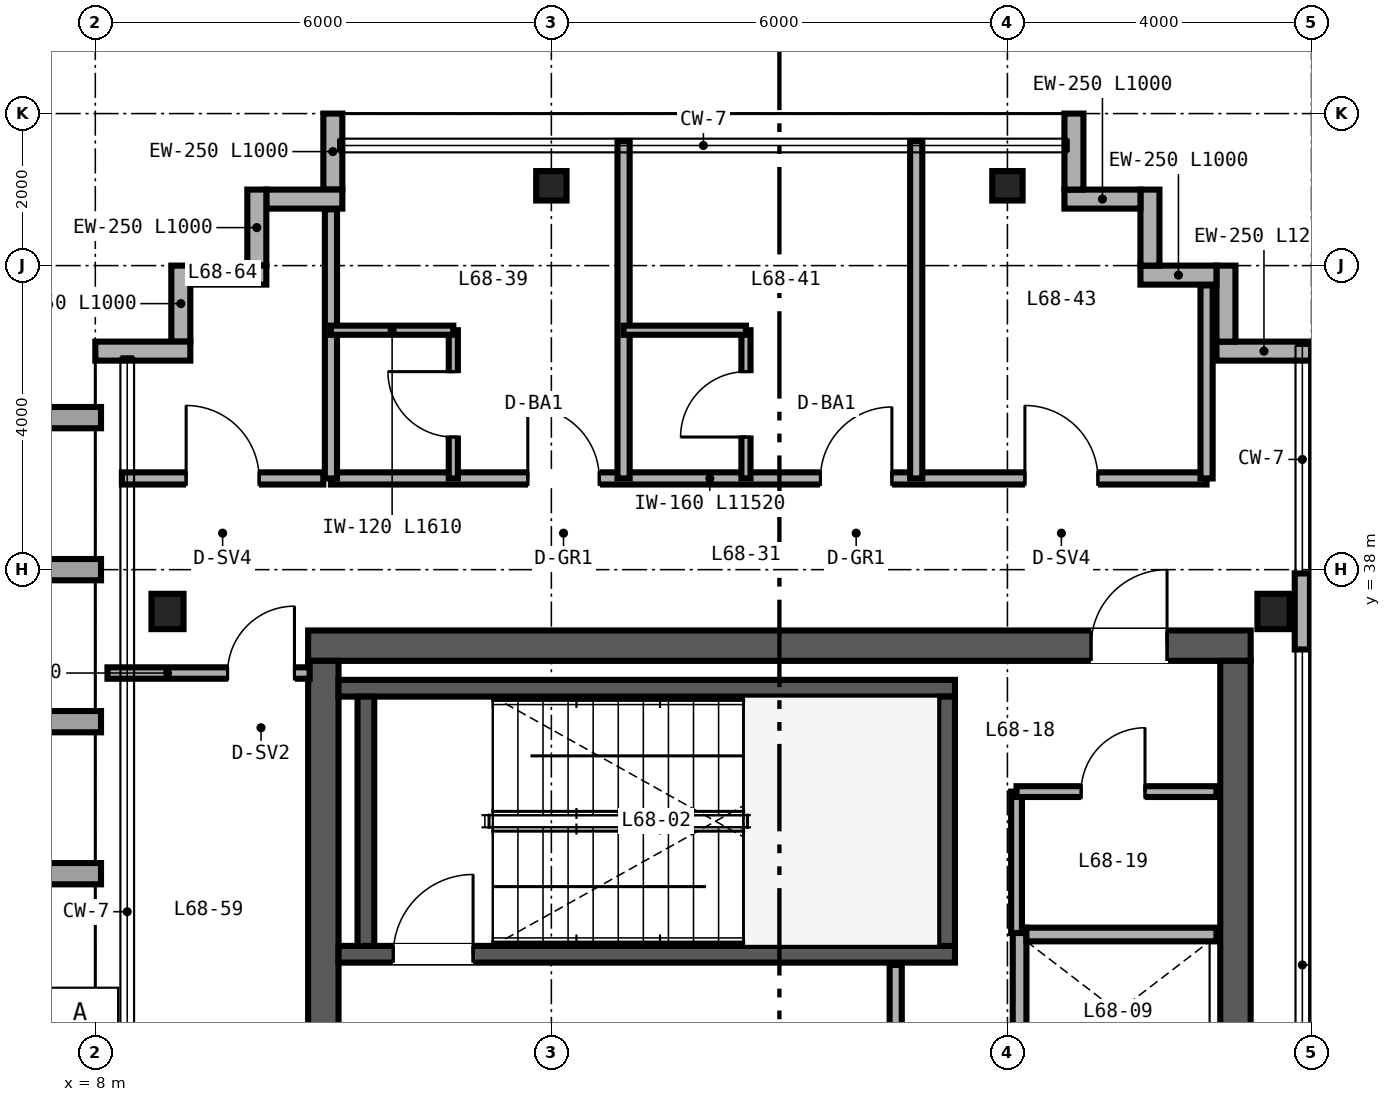
"""IFC4 building model, lengths in metres.
Left out: names, types, materials, properties, quantities, classifications, styles, units other than length and angle.
Written with IfcOpenShell. Run it as: python <this file> out.ifc"""

import sys

from ifc_helpers import new_model, si_unit, direction, frame, frame_2d, origin, origin_2d, place, context, subcontext, project, spatial, rectangle, i_section, extrude, source, transform, mapped, element, fill, save


model = new_model("IFC4")
c1 = context("Model", 3, precision=1e-05, world=origin(), true_north=direction((0.0, 1.0)))
c2 = subcontext(c1, "Body", "Model", "MODEL_VIEW")
j1 = project(units=[si_unit("LENGTHUNIT", "METRE"), si_unit("PLANEANGLEUNIT", "RADIAN")], contexts=[c1])
p1 = place(None, origin())
s1 = spatial("IfcSite", under=j1, at=p1, CompositionType="ELEMENT")
p2 = place(p1, origin())
s2 = spatial("IfcBuilding", under=s1, at=p2, CompositionType="ELEMENT")
p3 = place(p2, frame((0.0, 0.0, 268.8)))
s3 = spatial("IfcBuildingStorey", under=s2, at=p3, CompositionType="ELEMENT", Elevation=268.8)
p4 = place(p3, frame((10.8, 37.0, 0.0), z_axis=(0.0, 0.0, 1.0), x_axis=(1.0, 0.0, 0.0)))
e1 = element("IfcWall", 1, at=p4, inside=s3, PredefinedType="SHEAR", context=c2, shape_type="SweptSolid", body=[
    extrude(rectangle(XDim=12.4, YDim=0.4, at=frame_2d((6.2, 0.0))), origin(), (0.0, 0.0, 1.0), 3.28),
])
p5 = place(p4, frame((10.3, 0.0, 0.0)))
e2 = element("IfcOpeningElement", 2, at=p5, cuts=e1, PredefinedType="OPENING", context=c2, shape_type="SweptSolid", body=[
    extrude(rectangle(XDim=1.0, YDim=2.15, at=frame_2d((0.5, 1.075))), frame((0.0, 0.21, 0.0), z_axis=(0.0, -1.0, 0.0), x_axis=(1.0, 0.0, 0.0)), (0.0, 0.0, 1.0), 0.42),
])
for number, where, z_axis, x_axis in (
    (3, (11.0, 15.2, 0.0), (0.0, 0.0, 1.0), (0.0, 1.0, 0.0)),
    (4, (23.0, 15.2, 0.0), (0.0, 0.0, 1.0), (0.0, 1.0, 0.0)),
):
    element("IfcWall", number, at=place(p3, frame(where, z_axis=z_axis, x_axis=x_axis)), inside=s3, PredefinedType="SHEAR", context=c2, shape_type="SweptSolid", body=[
        extrude(rectangle(XDim=21.6, YDim=0.4, at=frame_2d((10.8, 0.0))), origin(), (0.0, 0.0, 1.0), 3.28),
    ])
p6 = place(p3, frame((11.2, 32.94, 0.0), z_axis=(0.0, 0.0, 1.0), x_axis=(1.0, 0.0, 0.0)))
e5 = element("IfcWall", 5, at=p6, inside=s3, PredefinedType="SHEAR", context=c2, shape_type="SweptSolid", body=[
    extrude(rectangle(XDim=8.11, YDim=0.22, at=frame_2d((4.055, 0.0))), origin(), (0.0, 0.0, 1.0), 3.4),
])
p7 = place(p6, frame((0.72, 0.0, 0.0)))
e6 = element("IfcOpeningElement", 6, at=p7, cuts=e5, PredefinedType="OPENING", context=c2, shape_type="SweptSolid", body=[
    extrude(rectangle(XDim=1.05, YDim=2.15, at=frame_2d((0.525, 1.075))), frame((0.0, 0.12, 0.0), z_axis=(0.0, -1.0, 0.0), x_axis=(1.0, 0.0, 0.0)), (0.0, 0.0, 1.0), 0.24),
])
p8 = place(p3, frame((11.2, 36.44, 0.0), z_axis=(0.0, 0.0, 1.0), x_axis=(1.0, 0.0, 0.0)))
e7 = element("IfcWall", 7, at=p8, inside=s3, PredefinedType="SHEAR", context=c2, shape_type="SweptSolid", body=[
    extrude(rectangle(XDim=8.11, YDim=0.22, at=frame_2d((4.055, 0.0))), origin(), (0.0, 0.0, 1.0), 3.4),
])
for number, where, z_axis, x_axis in (
    (8, (11.56, 33.05, 0.0), (0.0, 0.0, 1.0), (0.0, 1.0, 0.0)),
    (9, (19.2, 33.05, 0.0), (0.0, 0.0, 1.0), (0.0, 1.0, 0.0)),
):
    element("IfcWall", number, at=place(p3, frame(where, z_axis=z_axis, x_axis=x_axis)), inside=s3, PredefinedType="SHEAR", context=c2, shape_type="SweptSolid", body=[
        extrude(rectangle(XDim=3.28, YDim=0.22, at=frame_2d((1.64, 0.0))), origin(), (0.0, 0.0, 1.0), 3.4),
    ])
m1 = source(origin(), c2, "Body", "SweptSolid", [
    extrude(i_section(OverallWidth=0.422, OverallDepth=0.465, WebThickness=0.045, FlangeThickness=0.073, FilletRadius=0.025, at=origin_2d()), origin(), (0.0, 0.0, 1.0), 3.28),
])
for number, where, z_axis, x_axis in (
    (10, (8.95, 37.45, 0.0), (0.0, 0.0, 1.0), (1.0, 0.0, 0.0)),
    (11, (23.5, 37.45, 0.0), (0.0, 0.0, 1.0), (1.0, 0.0, 0.0)),
):
    element("IfcColumn", number, at=place(p3, frame(where, z_axis=z_axis, x_axis=x_axis)), inside=s3, PredefinedType="COLUMN", context=c2, shape_type="MappedRepresentation", body=[
        mapped(m1, transform((0.0, 0.0, 0.0), scale=1.0)),
    ])
m2 = source(origin(), c2, "Body", "SweptSolid", [
    extrude(i_section(OverallWidth=0.399, OverallDepth=0.387, WebThickness=0.021, FlangeThickness=0.033, FilletRadius=0.025, at=origin_2d()), origin(), (0.0, 0.0, 1.0), 3.28),
])
for number, where, z_axis, x_axis in (
    (12, (14.0, 43.05, 0.0), (0.0, 0.0, 1.0), (1.0, 0.0, 0.0)),
    (13, (20.0, 43.05, 0.0), (0.0, 0.0, 1.0), (1.0, 0.0, 0.0)),
):
    element("IfcColumn", number, at=place(p3, frame(where, z_axis=z_axis, x_axis=x_axis)), inside=s3, PredefinedType="COLUMN", context=c2, shape_type="MappedRepresentation", body=[
        mapped(m2, transform((0.0, 0.0, 0.0), scale=1.0)),
    ])
p9 = place(p3, frame((24.0, 40.875, 0.0), z_axis=(0.0, 0.0, 1.0), x_axis=(-1.0, 0.0, 0.0)))
e14 = element("IfcWall", 14, at=p9, inside=s3, PredefinedType="SOLIDWALL", context=c2, shape_type="SweptSolid", body=[
    extrude(rectangle(XDim=1.25, YDim=0.25, at=frame_2d((0.625, 0.0))), origin(), (0.0, 0.0, 1.0), 3.28),
])
for number, where, z_axis, x_axis in (
    (15, (22.875, 41.0, 0.0), (0.0, 0.0, 1.0), (0.0, 1.0, 0.0)),
    (16, (22.75, 41.875, 0.0), (0.0, 0.0, 1.0), (-1.0, 0.0, 0.0)),
    (17, (21.875, 42.0, 0.0), (0.0, 0.0, 1.0), (0.0, 1.0, 0.0)),
    (18, (21.75, 42.875, 0.0), (0.0, 0.0, 1.0), (-1.0, 0.0, 0.0)),
    (19, (20.875, 43.0, 0.0), (0.0, 0.0, 1.0), (0.0, 1.0, 0.0)),
    (20, (11.125, 44.0, 0.0), (0.0, 0.0, 1.0), (0.0, -1.0, 0.0)),
    (21, (11.25, 42.875, 0.0), (0.0, 0.0, 1.0), (-1.0, 0.0, 0.0)),
    (22, (10.125, 43.0, 0.0), (0.0, 0.0, 1.0), (0.0, -1.0, 0.0)),
    (23, (10.25, 41.875, 0.0), (0.0, 0.0, 1.0), (-1.0, 0.0, 0.0)),
    (24, (9.125, 42.0, 0.0), (0.0, 0.0, 1.0), (0.0, -1.0, 0.0)),
):
    element("IfcWall", number, at=place(p3, frame(where, z_axis=z_axis, x_axis=x_axis)), inside=s3, PredefinedType="SOLIDWALL", context=c2, shape_type="SweptSolid", body=[
        extrude(rectangle(XDim=1.0, YDim=0.25, at=frame_2d((0.5, 0.0))), origin(), (0.0, 0.0, 1.0), 3.28),
    ])
p10 = place(p3, frame((9.25, 40.875, 0.0), z_axis=(0.0, 0.0, 1.0), x_axis=(-1.0, 0.0, 0.0)))
e25 = element("IfcWall", 25, at=p10, inside=s3, PredefinedType="SOLIDWALL", context=c2, shape_type="SweptSolid", body=[
    extrude(rectangle(XDim=1.25, YDim=0.25, at=frame_2d((0.625, 0.0))), origin(), (0.0, 0.0, 1.0), 3.28),
])
p11 = place(p3, frame((23.88, 36.95, 0.0), z_axis=(0.0, 0.0, 1.0), x_axis=(0.0, 1.0, 0.0)))
e26 = element("IfcWall", 26, at=p11, inside=s3, PredefinedType="PARAPET", context=c2, shape_type="SweptSolid", body=[
    extrude(rectangle(XDim=1.0, YDim=0.2, at=frame_2d((0.5, 0.0))), origin(), (0.0, 0.0, 1.0), 1.73),
])
p12 = place(p3, frame((20.16, 29.0, 0.0), z_axis=(0.0, 0.0, 1.0), x_axis=(0.0, 1.0, 0.0)))
e27 = element("IfcWall", 27, at=p12, inside=s3, PredefinedType="SOLIDWALL", context=c2, shape_type="SweptSolid", body=[
    extrude(rectangle(XDim=4.29, YDim=0.18, at=frame_2d((2.145, 0.0))), origin(), (0.0, 0.0, 1.0), 3.28),
])
p13 = place(p3, frame((20.25, 33.2, 0.0), z_axis=(0.0, 0.0, 1.0), x_axis=(1.0, 0.0, 0.0)))
e28 = element("IfcWall", 28, at=p13, inside=s3, PredefinedType="SOLIDWALL", context=c2, shape_type="SweptSolid", body=[
    extrude(rectangle(XDim=2.5, YDim=0.18, at=frame_2d((1.25, 0.0))), origin(), (0.0, 0.0, 1.0), 3.28),
])
p14 = place(p3, frame((18.53, 28.9, 0.0), z_axis=(0.0, 0.0, 1.0), x_axis=(0.0, 1.0, 0.0)))
e29 = element("IfcWall", 29, at=p14, inside=s3, PredefinedType="PARTITIONING", context=c2, shape_type="SweptSolid", body=[
    extrude(rectangle(XDim=3.9, YDim=0.16, at=frame_2d((1.95, 0.0))), origin(), (0.0, 0.0, 1.0), 3.28),
])
p15 = place(p14, frame((1.5, 0.0, 0.0)))
e30 = element("IfcOpeningElement", 30, at=p15, cuts=e29, PredefinedType="OPENING", context=c2, shape_type="SweptSolid", body=[
    extrude(rectangle(XDim=1.0, YDim=2.15, at=frame_2d((0.5, 1.075))), frame((0.0, 0.09, 0.0), z_axis=(0.0, -1.0, 0.0), x_axis=(1.0, 0.0, 0.0)), (0.0, 0.0, 1.0), 0.18),
])
p16 = place(p3, frame((20.12, 33.22, 0.0), z_axis=(0.0, 0.0, 1.0), x_axis=(0.0, 1.0, 0.0)))
e31 = element("IfcWall", 31, at=p16, inside=s3, PredefinedType="PARTITIONING", context=c2, shape_type="SweptSolid", body=[
    extrude(rectangle(XDim=1.86, YDim=0.142, at=frame_2d((0.93, 0.0))), origin(), (0.0, 0.0, 1.0), 3.28),
])
p17 = place(p3, frame((20.12, 35.08, 0.0), z_axis=(0.0, 0.0, 1.0), x_axis=(1.0, 0.0, 0.0)))
e32 = element("IfcWall", 32, at=p17, inside=s3, PredefinedType="PARTITIONING", context=c2, shape_type="SweptSolid", body=[
    extrude(rectangle(XDim=2.63, YDim=0.142, at=frame_2d((1.315, 0.0))), origin(), (0.0, 0.0, 1.0), 3.28),
])
p18 = place(p17, frame((0.85, 0.0, 0.0)))
e33 = element("IfcOpeningElement", 33, at=p18, cuts=e32, PredefinedType="OPENING", context=c2, shape_type="SweptSolid", body=[
    extrude(rectangle(XDim=0.84, YDim=2.1, at=frame_2d((0.42, 1.05))), frame((0.0, 0.081, 0.0), z_axis=(0.0, -1.0, 0.0), x_axis=(1.0, 0.0, 0.0)), (0.0, 0.0, 1.0), 0.162),
])
p19 = place(p3, frame((11.1, 39.2, 0.0), z_axis=(0.0, 0.0, 1.0), x_axis=(1.0, 0.0, 0.0)))
e34 = element("IfcWall", 34, at=p19, inside=s3, PredefinedType="PARTITIONING", context=c2, shape_type="SweptSolid", body=[
    extrude(rectangle(XDim=11.52, YDim=0.16, at=frame_2d((5.76, 0.0))), origin(), (0.0, 0.0, 1.0), 3.28),
])
p20 = place(p19, frame((2.59, 0.0, 0.0)))
e35 = element("IfcOpeningElement", 35, at=p20, cuts=e34, PredefinedType="OPENING", context=c2, shape_type="SweptSolid", body=[
    extrude(rectangle(XDim=0.94, YDim=2.15, at=frame_2d((0.47, 1.075))), frame((0.0, 0.09, 0.0), z_axis=(0.0, -1.0, 0.0), x_axis=(1.0, 0.0, 0.0)), (0.0, 0.0, 1.0), 0.18),
])
p21 = place(p19, frame((6.44, 0.0, 0.0)))
e36 = element("IfcOpeningElement", 36, at=p21, cuts=e34, PredefinedType="OPENING", context=c2, shape_type="SweptSolid", body=[
    extrude(rectangle(XDim=0.94, YDim=2.15, at=frame_2d((0.47, 1.075))), frame((0.0, 0.09, 0.0), z_axis=(0.0, -1.0, 0.0), x_axis=(1.0, 0.0, 0.0)), (0.0, 0.0, 1.0), 0.18),
])
p22 = place(p19, frame((9.13, 0.0, 0.0)))
e37 = element("IfcOpeningElement", 37, at=p22, cuts=e34, PredefinedType="OPENING", context=c2, shape_type="SweptSolid", body=[
    extrude(rectangle(XDim=0.96, YDim=2.15, at=frame_2d((0.48, 1.075))), frame((0.0, 0.09, 0.0), z_axis=(0.0, -1.0, 0.0), x_axis=(1.0, 0.0, 0.0)), (0.0, 0.0, 1.0), 0.18),
])
p23 = place(p3, frame((11.1, 39.2, 0.0), z_axis=(0.0, 0.0, 1.0), x_axis=(0.0, 1.0, 0.0)))
e38 = element("IfcWall", 38, at=p23, inside=s3, PredefinedType="PARTITIONING", context=c2, shape_type="SweptSolid", body=[
    extrude(rectangle(XDim=3.54, YDim=0.16, at=frame_2d((1.77, 0.0))), origin(), (0.0, 0.0, 1.0), 3.28),
])
p24 = place(p3, frame((22.62, 39.2, 0.0), z_axis=(0.0, 0.0, 1.0), x_axis=(0.0, 1.0, 0.0)))
e39 = element("IfcWall", 39, at=p24, inside=s3, PredefinedType="PARTITIONING", context=c2, shape_type="SweptSolid", body=[
    extrude(rectangle(XDim=2.54, YDim=0.16, at=frame_2d((1.27, 0.0))), origin(), (0.0, 0.0, 1.0), 3.28),
])
p25 = place(p3, frame((14.95, 39.2, 0.0), z_axis=(0.0, 0.0, 1.0), x_axis=(0.0, 1.0, 0.0)))
e40 = element("IfcWall", 40, at=p25, inside=s3, PredefinedType="PARTITIONING", context=c2, shape_type="SweptSolid", body=[
    extrude(rectangle(XDim=4.44, YDim=0.16, at=frame_2d((2.22, 0.0))), origin(), (0.0, 0.0, 1.0), 2.587),
])
p26 = place(p3, frame((12.71, 39.2, 0.0), z_axis=(0.0, 0.0, 1.0), x_axis=(0.0, 1.0, 0.0)))
e41 = element("IfcWall", 41, at=p26, inside=s3, PredefinedType="PARTITIONING", context=c2, shape_type="SweptSolid", body=[
    extrude(rectangle(XDim=1.95, YDim=0.12, at=frame_2d((0.975, 0.0))), origin(), (0.0, 0.0, 1.0), 3.28),
])
p27 = place(p26, frame((0.545, 0.0, 0.0)))
e42 = element("IfcOpeningElement", 42, at=p27, cuts=e41, PredefinedType="OPENING", context=c2, shape_type="SweptSolid", body=[
    extrude(rectangle(XDim=0.86, YDim=2.1, at=frame_2d((0.43, 1.05))), frame((0.0, 0.07, 0.0), z_axis=(0.0, -1.0, 0.0), x_axis=(1.0, 0.0, 0.0)), (0.0, 0.0, 1.0), 0.14),
])
p28 = place(p3, frame((11.1, 41.15, 0.0), z_axis=(0.0, 0.0, 1.0), x_axis=(1.0, 0.0, 0.0)))
e43 = element("IfcWall", 43, at=p28, inside=s3, PredefinedType="PARTITIONING", context=c2, shape_type="SweptSolid", body=[
    extrude(rectangle(XDim=1.61, YDim=0.12, at=frame_2d((0.805, 0.0))), origin(), (0.0, 0.0, 1.0), 3.28),
])
p29 = place(p3, frame((18.8, 39.2, 0.0), z_axis=(0.0, 0.0, 1.0), x_axis=(0.0, 1.0, 0.0)))
e44 = element("IfcWall", 44, at=p29, inside=s3, PredefinedType="PARTITIONING", context=c2, shape_type="SweptSolid", body=[
    extrude(rectangle(XDim=4.44, YDim=0.16, at=frame_2d((2.22, 0.0))), origin(), (0.0, 0.0, 1.0), 2.587),
])
p30 = place(p3, frame((16.56, 39.2, 0.0), z_axis=(0.0, 0.0, 1.0), x_axis=(0.0, 1.0, 0.0)))
e45 = element("IfcWall", 45, at=p30, inside=s3, PredefinedType="PARTITIONING", context=c2, shape_type="SweptSolid", body=[
    extrude(rectangle(XDim=1.95, YDim=0.12, at=frame_2d((0.975, 0.0))), origin(), (0.0, 0.0, 1.0), 3.28),
])
p31 = place(p30, frame((0.545, 0.0, 0.0)))
e46 = element("IfcOpeningElement", 46, at=p31, cuts=e45, PredefinedType="OPENING", context=c2, shape_type="SweptSolid", body=[
    extrude(rectangle(XDim=0.86, YDim=2.1, at=frame_2d((0.43, 1.05))), frame((0.0, 0.07, 0.0), z_axis=(0.0, -1.0, 0.0), x_axis=(1.0, 0.0, 0.0)), (0.0, 0.0, 1.0), 0.14),
])
p32 = place(p3, frame((14.95, 41.15, 0.0), z_axis=(0.0, 0.0, 1.0), x_axis=(1.0, 0.0, 0.0)))
e47 = element("IfcWall", 47, at=p32, inside=s3, PredefinedType="PARTITIONING", context=c2, shape_type="SweptSolid", body=[
    extrude(rectangle(XDim=1.61, YDim=0.12, at=frame_2d((0.805, 0.0))), origin(), (0.0, 0.0, 1.0), 3.28),
])
p33 = place(p3, frame((8.16, 36.64, 0.0), z_axis=(0.0, 0.0, 1.0), x_axis=(1.0, 0.0, 0.0)))
e48 = element("IfcWall", 48, at=p33, inside=s3, PredefinedType="PARTITIONING", context=c2, shape_type="SweptSolid", body=[
    extrude(rectangle(XDim=2.66, YDim=0.15, at=frame_2d((1.33, 0.0))), origin(), (0.0, 0.0, 1.0), 2.663),
])
p34 = place(p33, frame((1.58, 0.0, 0.0)))
e49 = element("IfcOpeningElement", 49, at=p34, cuts=e48, PredefinedType="OPENING", context=c2, shape_type="SweptSolid", body=[
    extrude(rectangle(XDim=0.88, YDim=2.15, at=frame_2d((0.44, 1.075))), frame((0.0, 0.085, 0.0), z_axis=(0.0, -1.0, 0.0), x_axis=(1.0, 0.0, 0.0)), (0.0, 0.0, 1.0), 0.17),
])
p35 = place(p3, frame((8.35, 39.2, 0.0), z_axis=(0.0, 0.0, 1.0), x_axis=(1.0, 0.0, 0.0)))
e50 = element("IfcWall", 50, at=p35, inside=s3, PredefinedType="PARTITIONING", context=c2, shape_type="SweptSolid", body=[
    extrude(rectangle(XDim=2.65, YDim=0.16, at=frame_2d((1.325, 0.0))), origin(), (0.0, 0.0, 1.0), 3.28),
])
p36 = place(p35, frame((0.845, 0.0, 0.0)))
e51 = element("IfcOpeningElement", 51, at=p36, cuts=e50, PredefinedType="OPENING", context=c2, shape_type="SweptSolid", body=[
    extrude(rectangle(XDim=0.96, YDim=2.15, at=frame_2d((0.48, 1.075))), frame((0.0, 0.09, 0.0), z_axis=(0.0, -1.0, 0.0), x_axis=(1.0, 0.0, 0.0)), (0.0, 0.0, 1.0), 0.18),
])
m3 = source(origin(), c2, "Body", "SweptSolid", [
    extrude(rectangle(XDim=1.05, YDim=2.15, at=frame_2d((0.525, 1.075))), frame((0.0, 0.025, 0.0), z_axis=(0.0, -1.0, 0.0), x_axis=(1.0, 0.0, 0.0)), (0.0, 0.0, 1.0), 0.05),
])
p37 = place(p7, origin())
e52 = element("IfcDoor", 52, at=p37, inside=s3, OperationType="SINGLE_SWING_RIGHT", PredefinedType="DOOR", context=c2, shape_type="MappedRepresentation", body=[
    mapped(m3, transform((0.0, 0.0, 0.0), scale=1.0)),
])
fill(e6, e52)
m4 = source(origin(), c2, "Body", "SweptSolid", [
    extrude(rectangle(XDim=0.84, YDim=2.1, at=frame_2d((0.42, 1.05))), frame((0.0, 0.025, 0.0), z_axis=(0.0, -1.0, 0.0), x_axis=(1.0, 0.0, 0.0)), (0.0, 0.0, 1.0), 0.05),
])
p38 = place(p18, origin())
e53 = element("IfcDoor", 53, at=p38, inside=s3, OperationType="SINGLE_SWING_RIGHT", PredefinedType="DOOR", context=c2, shape_type="MappedRepresentation", body=[
    mapped(m4, transform((0.0, 0.0, 0.0), scale=1.0)),
])
fill(e33, e53)
m5 = source(origin(), c2, "Body", "SweptSolid", [
    extrude(rectangle(XDim=1.0, YDim=2.15, at=frame_2d((0.5, 1.075))), frame((0.0, 0.025, 0.0), z_axis=(0.0, -1.0, 0.0), x_axis=(1.0, 0.0, 0.0)), (0.0, 0.0, 1.0), 0.05),
])
p39 = place(p5, origin())
e54 = element("IfcDoor", 54, at=p39, inside=s3, OperationType="SINGLE_SWING_RIGHT", PredefinedType="DOOR", context=c2, shape_type="MappedRepresentation", body=[
    mapped(m5, transform((0.0, 0.0, 0.0), scale=1.0)),
])
fill(e2, e54)
m6 = source(origin(), c2, "Body", "SweptSolid", [
    extrude(rectangle(XDim=0.86, YDim=2.1, at=frame_2d((0.43, 1.05))), frame((0.0, 0.025, 0.0), z_axis=(0.0, -1.0, 0.0), x_axis=(1.0, 0.0, 0.0)), (0.0, 0.0, 1.0), 0.05),
])
p40 = place(p27, origin())
e55 = element("IfcDoor", 55, at=p40, inside=s3, OperationType="SINGLE_SWING_RIGHT", PredefinedType="DOOR", context=c2, shape_type="MappedRepresentation", body=[
    mapped(m6, transform((0.0, 0.0, 0.0), scale=1.0)),
])
fill(e42, e55)
p41 = place(p31, origin())
e56 = element("IfcDoor", 56, at=p41, inside=s3, OperationType="SINGLE_SWING_LEFT", PredefinedType="DOOR", context=c2, shape_type="MappedRepresentation", body=[
    mapped(m6, transform((0.0, 0.0, 0.0), scale=1.0)),
])
fill(e46, e56)
m7 = source(origin(), c2, "Body", "SweptSolid", [
    extrude(rectangle(XDim=0.94, YDim=2.15, at=frame_2d((0.47, 1.075))), frame((0.0, 0.025, 0.0), z_axis=(0.0, -1.0, 0.0), x_axis=(1.0, 0.0, 0.0)), (0.0, 0.0, 1.0), 0.05),
])
p42 = place(p20, origin())
e57 = element("IfcDoor", 57, at=p42, inside=s3, OperationType="SINGLE_SWING_LEFT", PredefinedType="DOOR", context=c2, shape_type="MappedRepresentation", body=[
    mapped(m7, transform((0.0, 0.0, 0.0), scale=1.0)),
])
fill(e35, e57)
p43 = place(p21, origin())
e58 = element("IfcDoor", 58, at=p43, inside=s3, OperationType="SINGLE_SWING_RIGHT", PredefinedType="DOOR", context=c2, shape_type="MappedRepresentation", body=[
    mapped(m7, transform((0.0, 0.0, 0.0), scale=1.0)),
])
fill(e36, e58)
m8 = source(origin(), c2, "Body", "SweptSolid", [
    extrude(rectangle(XDim=0.96, YDim=2.15, at=frame_2d((0.48, 1.075))), frame((0.0, 0.025, 0.0), z_axis=(0.0, -1.0, 0.0), x_axis=(1.0, 0.0, 0.0)), (0.0, 0.0, 1.0), 0.05),
])
p44 = place(p22, origin())
e59 = element("IfcDoor", 59, at=p44, inside=s3, OperationType="SINGLE_SWING_LEFT", PredefinedType="DOOR", context=c2, shape_type="MappedRepresentation", body=[
    mapped(m8, transform((0.0, 0.0, 0.0), scale=1.0)),
])
fill(e37, e59)
m9 = source(origin(), c2, "Body", "SweptSolid", [
    extrude(rectangle(XDim=0.88, YDim=2.15, at=frame_2d((0.44, 1.075))), frame((0.0, 0.025, 0.0), z_axis=(0.0, -1.0, 0.0), x_axis=(1.0, 0.0, 0.0)), (0.0, 0.0, 1.0), 0.05),
])
p45 = place(p34, origin())
e60 = element("IfcDoor", 60, at=p45, inside=s3, OperationType="SINGLE_SWING_RIGHT", PredefinedType="DOOR", context=c2, shape_type="MappedRepresentation", body=[
    mapped(m9, transform((0.0, 0.0, 0.0), scale=1.0)),
])
fill(e49, e60)
p46 = place(p36, origin())
e61 = element("IfcDoor", 61, at=p46, inside=s3, OperationType="SINGLE_SWING_LEFT", PredefinedType="DOOR", context=c2, shape_type="MappedRepresentation", body=[
    mapped(m8, transform((0.0, 0.0, 0.0), scale=1.0)),
])
fill(e51, e61)
save(model, sys.argv[1])
